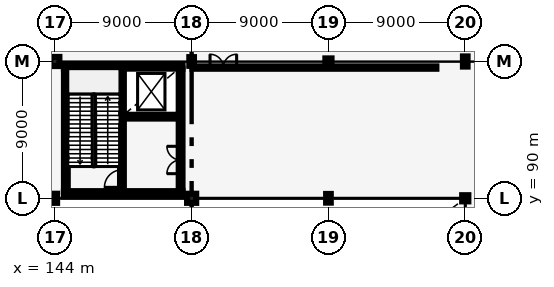
"""IFC4 building model, lengths in metres.
Left out: names, types, materials, properties, quantities, classifications, styles, units other than length and angle.
Written with IfcOpenShell. Run it as: python <this file> out.ifc"""

import sys

from ifc_helpers import new_model, si_unit, direction, frame, frame_2d, origin, origin_2d, place, context, subcontext, project, spatial, rectangle, hollow_circle, i_section, extrude, element, fill, save


model = new_model("IFC4")
c1 = context("Model", 3, precision=1e-05, world=origin(), true_north=direction((0.0, 1.0)))
c2 = subcontext(c1, "Body", "Model", "MODEL_VIEW")
j1 = project(units=[si_unit("LENGTHUNIT", "METRE"), si_unit("PLANEANGLEUNIT", "RADIAN")], contexts=[c1])
p1 = place(None, origin())
s1 = spatial("IfcSite", under=j1, at=p1, CompositionType="ELEMENT")
p2 = place(p1, origin())
s2 = spatial("IfcBuilding", under=s1, at=p2, CompositionType="ELEMENT")
p3 = place(p2, frame((0.0, 0.0, 6.0)))
s3 = spatial("IfcBuildingStorey", under=s2, at=p3, CompositionType="ELEMENT", Elevation=6.0)
p4 = place(p3, frame((144.0, 90.0, 0.0), z_axis=(0.0, 0.0, 1.0), x_axis=(1.0, 0.0, 0.0)))
e1 = element("IfcColumn", 1, at=p4, inside=s3, PredefinedType="COLUMN", context=c2, shape_type="SweptSolid", body=[
    extrude(i_section(OverallWidth=0.3, OverallDepth=0.6, WebThickness=0.015, FlangeThickness=0.03, FilletRadius=0.027, at=origin_2d()), origin(), (0.0, 0.0, 1.0), 6.0),
])
for number, where, z_axis, x_axis in (
    (2, (144.0, 99.0, 0.0), (0.0, 0.0, 1.0), (1.0, 0.0, 0.0)),
    (3, (153.0, 90.0, 0.0), (0.0, 0.0, 1.0), (1.0, 0.0, 0.0)),
):
    element("IfcColumn", number, at=place(p3, frame(where, z_axis=z_axis, x_axis=x_axis)), inside=s3, PredefinedType="COLUMN", context=c2, shape_type="SweptSolid", body=[
        extrude(rectangle(XDim=0.6, YDim=0.6, at=origin_2d()), origin(), (0.0, 0.0, 1.0), 6.0),
    ])
for number, where, z_axis, x_axis in (
    (4, (153.0, 99.0, 0.0), (0.0, 0.0, 1.0), (1.0, 0.0, 0.0)),
    (5, (162.0, 90.0, 0.0), (0.0, 0.0, 1.0), (1.0, 0.0, 0.0)),
):
    element("IfcColumn", number, at=place(p3, frame(where, z_axis=z_axis, x_axis=x_axis)), inside=s3, PredefinedType="COLUMN", context=c2, shape_type="SweptSolid", body=[
        extrude(i_section(OverallWidth=0.306, OverallDepth=0.572, WebThickness=0.021, FlangeThickness=0.04, FilletRadius=0.027, at=origin_2d()), origin(), (0.0, 0.0, 1.0), 6.0),
    ])
for number, where, z_axis, x_axis in (
    (6, (162.0, 99.0, 0.0), (0.0, 0.0, 1.0), (1.0, 0.0, 0.0)),
    (7, (171.0, 90.0, 0.0), (0.0, 0.0, 1.0), (1.0, 0.0, 0.0)),
):
    element("IfcColumn", number, at=place(p3, frame(where, z_axis=z_axis, x_axis=x_axis)), inside=s3, PredefinedType="COLUMN", context=c2, shape_type="SweptSolid", body=[
        extrude(hollow_circle(Radius=0.203, WallThickness=0.016, at=origin_2d()), origin(), (0.0, 0.0, 1.0), 6.0),
    ])
p5 = place(p3, frame((171.0, 99.0, 0.0), z_axis=(0.0, 0.0, 1.0), x_axis=(1.0, 0.0, 0.0)))
e8 = element("IfcColumn", 8, at=p5, inside=s3, PredefinedType="COLUMN", context=c2, shape_type="SweptSolid", body=[
    extrude(i_section(OverallWidth=0.305, OverallDepth=0.668, WebThickness=0.021, FlangeThickness=0.04, FilletRadius=0.027, at=origin_2d()), origin(), (0.0, 0.0, 1.0), 6.0),
])
p6 = place(p3, frame((144.725, 90.47, 0.0), z_axis=(0.0, 0.0, 1.0), x_axis=(0.0, 1.0, 0.0)))
e9 = element("IfcWall", 9, at=p6, inside=s3, PredefinedType="SHEAR", context=c2, shape_type="SweptSolid", body=[
    extrude(rectangle(XDim=8.06, YDim=0.25, at=frame_2d((4.03, 0.0))), origin(), (0.0, 0.0, 1.0), 5.64),
])
p7 = place(p3, frame((152.275, 90.47, 0.0), z_axis=(0.0, 0.0, 1.0), x_axis=(0.0, 1.0, 0.0)))
e10 = element("IfcWall", 10, at=p7, inside=s3, PredefinedType="SHEAR", context=c2, shape_type="SweptSolid", body=[
    extrude(rectangle(XDim=8.06, YDim=0.25, at=frame_2d((4.03, 0.0))), origin(), (0.0, 0.0, 1.0), 5.64),
])
p8 = place(p7, frame((1.15, 0.0, 0.0)))
e11 = element("IfcOpeningElement", 11, at=p8, cuts=e10, PredefinedType="OPENING", context=c2, shape_type="SweptSolid", body=[
    extrude(rectangle(XDim=1.8, YDim=2.2, at=frame_2d((0.9, 1.1))), frame((0.0, 0.135, 0.0), z_axis=(0.0, -1.0, 0.0), x_axis=(1.0, 0.0, 0.0)), (0.0, 0.0, 1.0), 0.27),
])
for number, where, z_axis, x_axis in (
    (12, (144.6, 90.345, 0.0), (0.0, 0.0, 1.0), (1.0, 0.0, 0.0)),
    (13, (144.6, 98.655, 0.0), (0.0, 0.0, 1.0), (1.0, 0.0, 0.0)),
):
    element("IfcWall", number, at=place(p3, frame(where, z_axis=z_axis, x_axis=x_axis)), inside=s3, PredefinedType="SHEAR", context=c2, shape_type="SweptSolid", body=[
        extrude(rectangle(XDim=7.8, YDim=0.25, at=frame_2d((3.9, 0.0))), origin(), (0.0, 0.0, 1.0), 5.64),
    ])
p9 = place(p3, frame((148.415, 90.47, 0.0), z_axis=(0.0, 0.0, 1.0), x_axis=(0.0, 1.0, 0.0)))
e14 = element("IfcWall", 14, at=p9, inside=s3, PredefinedType="SHEAR", context=c2, shape_type="SweptSolid", body=[
    extrude(rectangle(XDim=8.06, YDim=0.25, at=frame_2d((4.03, 0.0))), origin(), (0.0, 0.0, 1.0), 5.64),
])
p10 = place(p9, frame((0.25, 0.0, 0.0)))
e15 = element("IfcOpeningElement", 15, at=p10, cuts=e14, PredefinedType="OPENING", context=c2, shape_type="SweptSolid", body=[
    extrude(rectangle(XDim=1.15, YDim=2.15, at=frame_2d((0.575, 1.075))), frame((0.0, 0.135, 0.0), z_axis=(0.0, -1.0, 0.0), x_axis=(1.0, 0.0, 0.0)), (0.0, 0.0, 1.0), 0.27),
])
p11 = place(p3, frame((148.54, 95.37, 0.0), z_axis=(0.0, 0.0, 1.0), x_axis=(1.0, 0.0, 0.0)))
e16 = element("IfcWall", 16, at=p11, inside=s3, PredefinedType="SHEAR", context=c2, shape_type="SweptSolid", body=[
    extrude(rectangle(XDim=3.61, YDim=0.25, at=frame_2d((1.805, 0.0))), origin(), (0.0, 0.0, 1.0), 5.64),
])
p12 = place(p11, frame((0.95, 0.0, 0.0)))
e17 = element("IfcOpeningElement", 17, at=p12, cuts=e16, PredefinedType="OPENING", context=c2, shape_type="SweptSolid", body=[
    extrude(rectangle(XDim=1.2, YDim=2.2, at=frame_2d((0.6, 1.1))), frame((0.0, 0.135, 0.0), z_axis=(0.0, -1.0, 0.0), x_axis=(1.0, 0.0, 0.0)), (0.0, 0.0, 1.0), 0.27),
])
p13 = place(p3, frame((153.06, 98.6, 0.0), z_axis=(0.0, 0.0, 1.0), x_axis=(1.0, 0.0, 0.0)))
e18 = element("IfcWall", 18, at=p13, inside=s3, PredefinedType="PARTITIONING", context=c2, shape_type="SweptSolid", body=[
    extrude(rectangle(XDim=16.04, YDim=0.155, at=frame_2d((8.02, 0.0))), origin(), (0.0, 0.0, 1.0), 4.85),
])
p14 = place(p13, frame((1.15, 0.0, 0.0)))
e19 = element("IfcOpeningElement", 19, at=p14, cuts=e18, PredefinedType="OPENING", context=c2, shape_type="SweptSolid", body=[
    extrude(rectangle(XDim=1.75, YDim=2.3, at=frame_2d((0.875, 1.15))), frame((0.0, 0.087, 0.0), z_axis=(0.0, -1.0, 0.0), x_axis=(1.0, 0.0, 0.0)), (0.0, 0.0, 1.0), 0.175),
])
p15 = place(p10, origin())
e20 = element("IfcDoor", 20, at=p15, inside=s3, OperationType="SINGLE_SWING_LEFT", PredefinedType="DOOR", context=c2, shape_type="SweptSolid", body=[
    extrude(rectangle(XDim=1.15, YDim=2.15, at=frame_2d((0.575, 1.075))), frame((0.0, 0.025, 0.0), z_axis=(0.0, -1.0, 0.0), x_axis=(1.0, 0.0, 0.0)), (0.0, 0.0, 1.0), 0.05),
])
fill(e15, e20)
p16 = place(p12, origin())
e21 = element("IfcDoor", 21, at=p16, inside=s3, OperationType="DOUBLE_DOOR_SLIDING", PredefinedType="DOOR", context=c2, shape_type="SweptSolid", body=[
    extrude(rectangle(XDim=1.2, YDim=2.2, at=frame_2d((0.6, 1.1))), frame((0.0, 0.025, 0.0), z_axis=(0.0, -1.0, 0.0), x_axis=(1.0, 0.0, 0.0)), (0.0, 0.0, 1.0), 0.05),
])
fill(e17, e21)
p17 = place(p8, origin())
e22 = element("IfcDoor", 22, at=p17, inside=s3, OperationType="DOUBLE_DOOR_SINGLE_SWING", PredefinedType="DOOR", context=c2, shape_type="SweptSolid", body=[
    extrude(rectangle(XDim=1.8, YDim=2.2, at=frame_2d((0.9, 1.1))), frame((0.0, 0.025, 0.0), z_axis=(0.0, -1.0, 0.0), x_axis=(1.0, 0.0, 0.0)), (0.0, 0.0, 1.0), 0.05),
])
fill(e11, e22)
p18 = place(p14, origin())
e23 = element("IfcDoor", 23, at=p18, inside=s3, OperationType="DOUBLE_DOOR_SINGLE_SWING", PredefinedType="DOOR", context=c2, shape_type="SweptSolid", body=[
    extrude(rectangle(XDim=1.75, YDim=2.3, at=frame_2d((0.875, 1.15))), frame((0.0, 0.025, 0.0), z_axis=(0.0, -1.0, 0.0), x_axis=(1.0, 0.0, 0.0)), (0.0, 0.0, 1.0), 0.05),
])
fill(e19, e23)
save(model, sys.argv[1])
